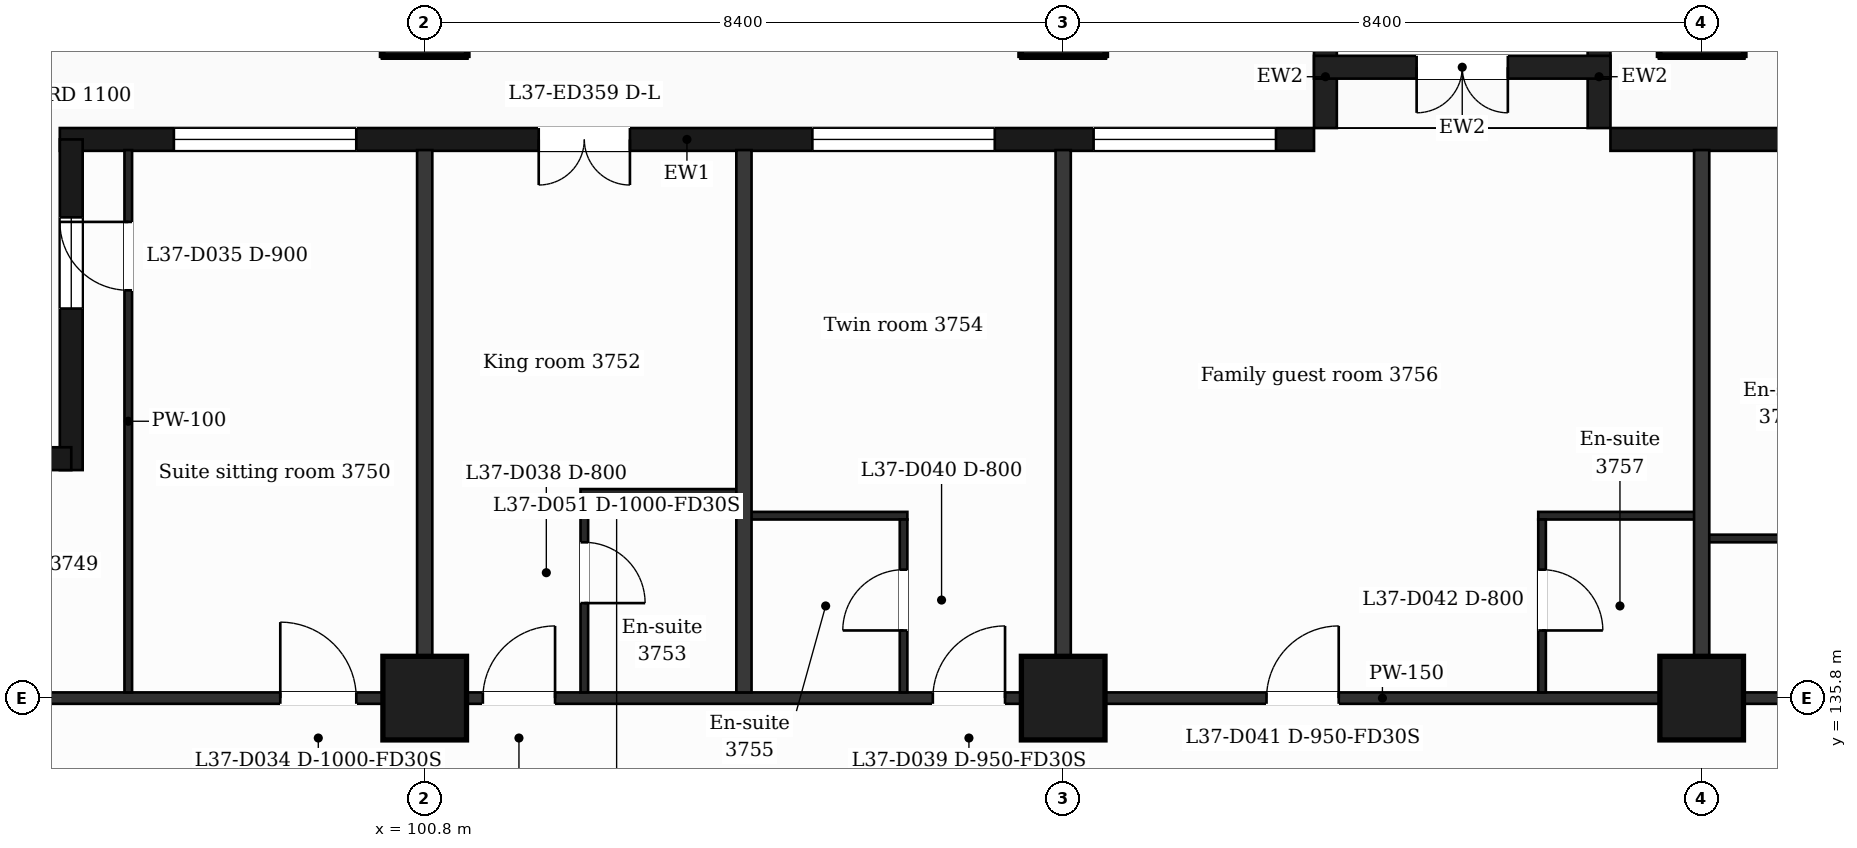
"""IFC4 building model, lengths in metres.
Left out: names, types, materials, properties, quantities, classifications, styles, units other than length and angle.
Written with IfcOpenShell. Run it as: python <this file> out.ifc"""

import sys

from ifc_helpers import new_model, si_unit, direction, frame, frame_2d, origin, origin_2d, place, context, subcontext, project, spatial, rectangle, extrude, element, fill, save


model = new_model("IFC4")
c1 = context("Model", 3, precision=1e-05, world=origin(), true_north=direction((0.0, 1.0)))
c2 = subcontext(c1, "Body", "Model", "MODEL_VIEW")
j1 = project(units=[si_unit("LENGTHUNIT", "METRE"), si_unit("PLANEANGLEUNIT", "RADIAN")], contexts=[c1])
p1 = place(None, origin())
s1 = spatial("IfcSite", under=j1, at=p1, CompositionType="ELEMENT")
p2 = place(p1, origin())
s2 = spatial("IfcBuilding", under=s1, at=p2, CompositionType="ELEMENT")
p3 = place(p2, frame((0.0, 0.0, 158.9)))
s3 = spatial("IfcBuildingStorey", under=s2, at=p3, CompositionType="ELEMENT", Elevation=158.9)
for number, where, z_axis, x_axis in (
    (1, (100.8, 135.8, 0.0), (0.0, 0.0, 1.0), (1.0, 0.0, 0.0)),
    (2, (109.2, 135.8, 0.0), (0.0, 0.0, 1.0), (1.0, 0.0, 0.0)),
    (3, (117.6, 135.8, 0.0), (0.0, 0.0, 1.0), (1.0, 0.0, 0.0)),
    (4, (100.8, 144.8, 0.0), (0.0, 0.0, 1.0), (1.0, 0.0, 0.0)),
    (5, (109.2, 144.8, 0.0), (0.0, 0.0, 1.0), (1.0, 0.0, 0.0)),
    (6, (117.6, 144.8, 0.0), (0.0, 0.0, 1.0), (1.0, 0.0, 0.0)),
):
    element("IfcColumn", number, at=place(p3, frame(where, z_axis=z_axis, x_axis=x_axis)), inside=s3, PredefinedType="COLUMN", context=c2, shape_type="SweptSolid", body=[
        extrude(rectangle(XDim=1.1, YDim=1.1, at=origin_2d()), origin(), (0.0, 0.0, 1.0), 3.7),
    ])
p4 = place(p3, frame((130.65, 143.15, 0.0), z_axis=(0.0, 0.0, 1.0), x_axis=(-1.0, 0.0, 0.0)))
e7 = element("IfcWall", 7, at=p4, inside=s3, PredefinedType="SOLIDWALL", context=c2, shape_type="SweptSolid", body=[
    extrude(rectangle(XDim=14.25, YDim=0.3, at=frame_2d((7.125, 0.0))), origin(), (0.0, 0.0, 1.0), 3.38),
])
p5 = place(p4, frame((1.35, 0.0, 0.9)))
e8 = element("IfcOpeningElement", 8, at=p5, cuts=e7, PredefinedType="OPENING", context=c2, shape_type="SweptSolid", body=[
    extrude(rectangle(XDim=2.4, YDim=2.1, at=frame_2d((1.2, 1.05))), frame((0.0, 0.16, 0.0), z_axis=(0.0, -1.0, 0.0), x_axis=(1.0, 0.0, 0.0)), (0.0, 0.0, 1.0), 0.32),
])
p6 = place(p4, frame((5.25, 0.0, 0.0)))
e9 = element("IfcOpeningElement", 9, at=p6, cuts=e7, PredefinedType="OPENING", context=c2, shape_type="SweptSolid", body=[
    extrude(rectangle(XDim=1.2, YDim=2.4, at=frame_2d((0.6, 1.2))), frame((0.0, 0.16, 0.0), z_axis=(0.0, -1.0, 0.0), x_axis=(1.0, 0.0, 0.0)), (0.0, 0.0, 1.0), 0.32),
])
p7 = place(p4, frame((7.05, 0.0, 0.9)))
e10 = element("IfcOpeningElement", 10, at=p7, cuts=e7, PredefinedType="OPENING", context=c2, shape_type="SweptSolid", body=[
    extrude(rectangle(XDim=1.2, YDim=2.1, at=frame_2d((0.6, 1.05))), frame((0.0, 0.16, 0.0), z_axis=(0.0, -1.0, 0.0), x_axis=(1.0, 0.0, 0.0)), (0.0, 0.0, 1.0), 0.32),
])
p8 = place(p4, frame((10.35, 0.0, 0.9)))
e11 = element("IfcOpeningElement", 11, at=p8, cuts=e7, PredefinedType="OPENING", context=c2, shape_type="SweptSolid", body=[
    extrude(rectangle(XDim=1.2, YDim=2.1, at=frame_2d((0.6, 1.05))), frame((0.0, 0.16, 0.0), z_axis=(0.0, -1.0, 0.0), x_axis=(1.0, 0.0, 0.0)), (0.0, 0.0, 1.0), 0.32),
])
p9 = place(p3, frame((112.5, 143.15, 0.0), z_axis=(0.0, 0.0, 1.0), x_axis=(-1.0, 0.0, 0.0)))
e12 = element("IfcWall", 12, at=p9, inside=s3, PredefinedType="SOLIDWALL", context=c2, shape_type="SweptSolid", body=[
    extrude(rectangle(XDim=16.5, YDim=0.3, at=frame_2d((8.25, 0.0))), origin(), (0.0, 0.0, 1.0), 3.38),
])
p10 = place(p9, frame((0.5, 0.0, 0.9)))
e13 = element("IfcOpeningElement", 13, at=p10, cuts=e12, PredefinedType="OPENING", context=c2, shape_type="SweptSolid", body=[
    extrude(rectangle(XDim=2.4, YDim=2.1, at=frame_2d((1.2, 1.05))), frame((0.0, 0.16, 0.0), z_axis=(0.0, -1.0, 0.0), x_axis=(1.0, 0.0, 0.0)), (0.0, 0.0, 1.0), 0.32),
])
p11 = place(p9, frame((4.2, 0.0, 0.9)))
e14 = element("IfcOpeningElement", 14, at=p11, cuts=e12, PredefinedType="OPENING", context=c2, shape_type="SweptSolid", body=[
    extrude(rectangle(XDim=2.4, YDim=2.1, at=frame_2d((1.2, 1.05))), frame((0.0, 0.16, 0.0), z_axis=(0.0, -1.0, 0.0), x_axis=(1.0, 0.0, 0.0)), (0.0, 0.0, 1.0), 0.32),
])
p12 = place(p9, frame((9.0, 0.0, 0.0)))
e15 = element("IfcOpeningElement", 15, at=p12, cuts=e12, PredefinedType="OPENING", context=c2, shape_type="SweptSolid", body=[
    extrude(rectangle(XDim=1.2, YDim=2.4, at=frame_2d((0.6, 1.2))), frame((0.0, 0.16, 0.0), z_axis=(0.0, -1.0, 0.0), x_axis=(1.0, 0.0, 0.0)), (0.0, 0.0, 1.0), 0.32),
])
p13 = place(p9, frame((12.6, 0.0, 0.9)))
e16 = element("IfcOpeningElement", 16, at=p13, cuts=e12, PredefinedType="OPENING", context=c2, shape_type="SweptSolid", body=[
    extrude(rectangle(XDim=2.4, YDim=2.1, at=frame_2d((1.2, 1.05))), frame((0.0, 0.16, 0.0), z_axis=(0.0, -1.0, 0.0), x_axis=(1.0, 0.0, 0.0)), (0.0, 0.0, 1.0), 0.32),
])
for number, where, z_axis, x_axis in (
    (17, (116.25, 143.3, 0.0), (0.0, 0.0, 1.0), (0.0, 1.0, 0.0)),
    (18, (112.65, 143.3, 0.0), (0.0, 0.0, 1.0), (0.0, 1.0, 0.0)),
):
    element("IfcWall", number, at=place(p3, frame(where, z_axis=z_axis, x_axis=x_axis)), inside=s3, PredefinedType="SOLIDWALL", context=c2, shape_type="SweptSolid", body=[
        extrude(rectangle(XDim=1.35, YDim=0.3, at=frame_2d((0.675, 0.0))), origin(), (0.0, 0.0, 1.0), 3.38),
    ])
p14 = place(p3, frame((116.4, 144.1, 0.0), z_axis=(0.0, 0.0, 1.0), x_axis=(-1.0, 0.0, 0.0)))
e19 = element("IfcWall", 19, at=p14, inside=s3, PredefinedType="SOLIDWALL", context=c2, shape_type="SweptSolid", body=[
    extrude(rectangle(XDim=3.9, YDim=0.3, at=frame_2d((1.95, 0.0))), origin(), (0.0, 0.0, 1.0), 3.38),
])
p15 = place(p14, frame((1.35, 0.0, 0.0)))
e20 = element("IfcOpeningElement", 20, at=p15, cuts=e19, PredefinedType="OPENING", context=c2, shape_type="SweptSolid", body=[
    extrude(rectangle(XDim=1.2, YDim=2.4, at=frame_2d((0.6, 1.2))), frame((0.0, 0.16, 0.0), z_axis=(0.0, -1.0, 0.0), x_axis=(1.0, 0.0, 0.0)), (0.0, 0.0, 1.0), 0.32),
])
p16 = place(p3, frame((96.15, 143.15, 0.0), z_axis=(0.0, 0.0, 1.0), x_axis=(0.0, -1.0, 0.0)))
e21 = element("IfcWall", 21, at=p16, inside=s3, PredefinedType="SOLIDWALL", context=c2, shape_type="SweptSolid", body=[
    extrude(rectangle(XDim=4.35, YDim=0.3, at=frame_2d((2.175, 0.0))), origin(), (0.0, 0.0, 1.0), 3.38),
])
p17 = place(p16, frame((1.025, 0.0, 0.9)))
e22 = element("IfcOpeningElement", 22, at=p17, cuts=e21, PredefinedType="OPENING", context=c2, shape_type="SweptSolid", body=[
    extrude(rectangle(XDim=1.2, YDim=2.1, at=frame_2d((0.6, 1.05))), frame((0.0, 0.16, 0.0), z_axis=(0.0, -1.0, 0.0), x_axis=(1.0, 0.0, 0.0)), (0.0, 0.0, 1.0), 0.32),
])
p18 = place(p3, frame((96.15, 138.95, 0.0), z_axis=(0.0, 0.0, 1.0), x_axis=(-1.0, 0.0, 0.0)))
e23 = element("IfcWall", 23, at=p18, inside=s3, PredefinedType="SOLIDWALL", context=c2, shape_type="SweptSolid", body=[
    extrude(rectangle(XDim=5.104, YDim=0.3, at=frame_2d((2.552, 0.0))), origin(), (0.0, 0.0, 1.0), 3.38),
])
p19 = place(p18, frame((0.725, 0.0, 0.9)))
e24 = element("IfcOpeningElement", 24, at=p19, cuts=e23, PredefinedType="OPENING", context=c2, shape_type="SweptSolid", body=[
    extrude(rectangle(XDim=2.4, YDim=2.1, at=frame_2d((1.2, 1.05))), frame((0.0, 0.16, 0.0), z_axis=(0.0, -1.0, 0.0), x_axis=(1.0, 0.0, 0.0)), (0.0, 0.0, 1.0), 0.32),
])
p20 = place(p3, frame((90.895, 135.8, 0.0), z_axis=(0.0, 0.0, 1.0), x_axis=(1.0, 0.0, 0.0)))
e25 = element("IfcWall", 25, at=p20, inside=s3, PredefinedType="PARTITIONING", context=c2, shape_type="SweptSolid", body=[
    extrude(rectangle(XDim=45.011, YDim=0.15, at=frame_2d((22.505, 0.0))), origin(), (0.0, 0.0, 1.0), 3.38),
])
p21 = place(p20, frame((8.005, 0.0, 0.0)))
e26 = element("IfcOpeningElement", 26, at=p21, cuts=e25, PredefinedType="OPENING", context=c2, shape_type="SweptSolid", body=[
    extrude(rectangle(XDim=1.0, YDim=2.1, at=frame_2d((0.5, 1.05))), frame((0.0, 0.085, 0.0), z_axis=(0.0, -1.0, 0.0), x_axis=(1.0, 0.0, 0.0)), (0.0, 0.0, 1.0), 0.17),
])
p22 = place(p20, frame((10.67, 0.0, 0.0)))
e27 = element("IfcOpeningElement", 27, at=p22, cuts=e25, PredefinedType="OPENING", context=c2, shape_type="SweptSolid", body=[
    extrude(rectangle(XDim=0.95, YDim=2.1, at=frame_2d((0.475, 1.05))), frame((0.0, 0.085, 0.0), z_axis=(0.0, -1.0, 0.0), x_axis=(1.0, 0.0, 0.0)), (0.0, 0.0, 1.0), 0.17),
])
p23 = place(p20, frame((16.59, 0.0, 0.0)))
e28 = element("IfcOpeningElement", 28, at=p23, cuts=e25, PredefinedType="OPENING", context=c2, shape_type="SweptSolid", body=[
    extrude(rectangle(XDim=0.95, YDim=2.1, at=frame_2d((0.475, 1.05))), frame((0.0, 0.085, 0.0), z_axis=(0.0, -1.0, 0.0), x_axis=(1.0, 0.0, 0.0)), (0.0, 0.0, 1.0), 0.17),
])
p24 = place(p20, frame((20.98, 0.0, 0.0)))
e29 = element("IfcOpeningElement", 29, at=p24, cuts=e25, PredefinedType="OPENING", context=c2, shape_type="SweptSolid", body=[
    extrude(rectangle(XDim=0.95, YDim=2.1, at=frame_2d((0.475, 1.05))), frame((0.0, 0.085, 0.0), z_axis=(0.0, -1.0, 0.0), x_axis=(1.0, 0.0, 0.0)), (0.0, 0.0, 1.0), 0.17),
])
p25 = place(p20, frame((29.335, 0.0, 0.0)))
e30 = element("IfcOpeningElement", 30, at=p25, cuts=e25, PredefinedType="OPENING", context=c2, shape_type="SweptSolid", body=[
    extrude(rectangle(XDim=0.95, YDim=2.1, at=frame_2d((0.475, 1.05))), frame((0.0, 0.085, 0.0), z_axis=(0.0, -1.0, 0.0), x_axis=(1.0, 0.0, 0.0)), (0.0, 0.0, 1.0), 0.17),
])
p26 = place(p20, frame((31.156, 0.0, 0.0)))
e31 = element("IfcOpeningElement", 31, at=p26, cuts=e25, PredefinedType="OPENING", context=c2, shape_type="SweptSolid", body=[
    extrude(rectangle(XDim=1.0, YDim=2.1, at=frame_2d((0.5, 1.05))), frame((0.0, 0.085, 0.0), z_axis=(0.0, -1.0, 0.0), x_axis=(1.0, 0.0, 0.0)), (0.0, 0.0, 1.0), 0.17),
])
p27 = place(p20, frame((36.775, 0.0, 0.0)))
e32 = element("IfcOpeningElement", 32, at=p27, cuts=e25, PredefinedType="OPENING", context=c2, shape_type="SweptSolid", body=[
    extrude(rectangle(XDim=1.0, YDim=2.1, at=frame_2d((0.5, 1.05))), frame((0.0, 0.085, 0.0), z_axis=(0.0, -1.0, 0.0), x_axis=(1.0, 0.0, 0.0)), (0.0, 0.0, 1.0), 0.17),
])
for number, where, z_axis, x_axis in (
    (33, (117.6, 137.9, 0.0), (0.0, 0.0, 1.0), (1.0, 0.0, 0.0)),
    (34, (105.0, 138.2, 0.0), (0.0, 0.0, 1.0), (1.0, 0.0, 0.0)),
):
    element("IfcWall", number, at=place(p3, frame(where, z_axis=z_axis, x_axis=x_axis)), inside=s3, PredefinedType="PARTITIONING", context=c2, shape_type="SweptSolid", body=[
        extrude(rectangle(XDim=2.15, YDim=0.1, at=frame_2d((1.075, 0.0))), origin(), (0.0, 0.0, 1.0), 3.38),
    ])
p28 = place(p3, frame((115.45, 138.2, 0.0), z_axis=(0.0, 0.0, 1.0), x_axis=(1.0, 0.0, 0.0)))
e35 = element("IfcWall", 35, at=p28, inside=s3, PredefinedType="PARTITIONING", context=c2, shape_type="SweptSolid", body=[
    extrude(rectangle(XDim=2.15, YDim=0.1, at=frame_2d((1.075, 0.0))), origin(), (0.0, 0.0, 1.0), 3.38),
])
p29 = place(p3, frame((102.85, 138.5, 0.0), z_axis=(0.0, 0.0, 1.0), x_axis=(1.0, 0.0, 0.0)))
e36 = element("IfcWall", 36, at=p29, inside=s3, PredefinedType="PARTITIONING", context=c2, shape_type="SweptSolid", body=[
    extrude(rectangle(XDim=2.15, YDim=0.1, at=frame_2d((1.075, 0.0))), origin(), (0.0, 0.0, 1.0), 3.38),
])
p30 = place(p3, frame((96.9, 135.875, 0.0), z_axis=(0.0, 0.0, 1.0), x_axis=(0.0, 1.0, 0.0)))
e37 = element("IfcWall", 37, at=p30, inside=s3, PredefinedType="PARTITIONING", context=c2, shape_type="SweptSolid", body=[
    extrude(rectangle(XDim=7.135, YDim=0.1, at=frame_2d((3.567, 0.0))), origin(), (0.0, 0.0, 1.0), 3.38),
])
p31 = place(p30, frame((5.29, 0.0, 0.0)))
e38 = element("IfcOpeningElement", 38, at=p31, cuts=e37, PredefinedType="OPENING", context=c2, shape_type="SweptSolid", body=[
    extrude(rectangle(XDim=0.9, YDim=2.1, at=frame_2d((0.45, 1.05))), frame((0.0, 0.06, 0.0), z_axis=(0.0, -1.0, 0.0), x_axis=(1.0, 0.0, 0.0)), (0.0, 0.0, 1.0), 0.12),
])
p32 = place(p3, frame((100.8, 135.875, 0.0), z_axis=(0.0, 0.0, 1.0), x_axis=(0.0, 1.0, 0.0)))
e39 = element("IfcWall", 39, at=p32, inside=s3, PredefinedType="PARTITIONING", context=c2, shape_type="SweptSolid", body=[
    extrude(rectangle(XDim=7.135, YDim=0.2, at=frame_2d((3.567, 0.0))), origin(), (0.0, 0.0, 1.0), 3.38),
])
p33 = place(p3, frame((102.9, 135.875, 0.0), z_axis=(0.0, 0.0, 1.0), x_axis=(0.0, 1.0, 0.0)))
e40 = element("IfcWall", 40, at=p33, inside=s3, PredefinedType="PARTITIONING", context=c2, shape_type="SweptSolid", body=[
    extrude(rectangle(XDim=2.575, YDim=0.1, at=frame_2d((1.288, 0.0))), origin(), (0.0, 0.0, 1.0), 3.38),
])
p34 = place(p33, frame((1.175, 0.0, 0.0)))
e41 = element("IfcOpeningElement", 41, at=p34, cuts=e40, PredefinedType="OPENING", context=c2, shape_type="SweptSolid", body=[
    extrude(rectangle(XDim=0.8, YDim=2.1, at=frame_2d((0.4, 1.05))), frame((0.0, 0.06, 0.0), z_axis=(0.0, -1.0, 0.0), x_axis=(1.0, 0.0, 0.0)), (0.0, 0.0, 1.0), 0.12),
])
p35 = place(p3, frame((105.0, 135.875, 0.0), z_axis=(0.0, 0.0, 1.0), x_axis=(0.0, 1.0, 0.0)))
e42 = element("IfcWall", 42, at=p35, inside=s3, PredefinedType="PARTITIONING", context=c2, shape_type="SweptSolid", body=[
    extrude(rectangle(XDim=7.135, YDim=0.2, at=frame_2d((3.567, 0.0))), origin(), (0.0, 0.0, 1.0), 3.38),
])
p36 = place(p3, frame((107.1, 135.875, 0.0), z_axis=(0.0, 0.0, 1.0), x_axis=(0.0, 1.0, 0.0)))
e43 = element("IfcWall", 43, at=p36, inside=s3, PredefinedType="PARTITIONING", context=c2, shape_type="SweptSolid", body=[
    extrude(rectangle(XDim=2.275, YDim=0.1, at=frame_2d((1.137, 0.0))), origin(), (0.0, 0.0, 1.0), 3.38),
])
p37 = place(p36, frame((0.815, 0.0, 0.0)))
e44 = element("IfcOpeningElement", 44, at=p37, cuts=e43, PredefinedType="OPENING", context=c2, shape_type="SweptSolid", body=[
    extrude(rectangle(XDim=0.8, YDim=2.1, at=frame_2d((0.4, 1.05))), frame((0.0, 0.06, 0.0), z_axis=(0.0, -1.0, 0.0), x_axis=(1.0, 0.0, 0.0)), (0.0, 0.0, 1.0), 0.12),
])
p38 = place(p3, frame((109.2, 135.875, 0.0), z_axis=(0.0, 0.0, 1.0), x_axis=(0.0, 1.0, 0.0)))
e45 = element("IfcWall", 45, at=p38, inside=s3, PredefinedType="PARTITIONING", context=c2, shape_type="SweptSolid", body=[
    extrude(rectangle(XDim=7.135, YDim=0.2, at=frame_2d((3.567, 0.0))), origin(), (0.0, 0.0, 1.0), 3.38),
])
p39 = place(p3, frame((115.5, 135.875, 0.0), z_axis=(0.0, 0.0, 1.0), x_axis=(0.0, 1.0, 0.0)))
e46 = element("IfcWall", 46, at=p39, inside=s3, PredefinedType="PARTITIONING", context=c2, shape_type="SweptSolid", body=[
    extrude(rectangle(XDim=2.275, YDim=0.1, at=frame_2d((1.137, 0.0))), origin(), (0.0, 0.0, 1.0), 3.38),
])
p40 = place(p39, frame((0.815, 0.0, 0.0)))
e47 = element("IfcOpeningElement", 47, at=p40, cuts=e46, PredefinedType="OPENING", context=c2, shape_type="SweptSolid", body=[
    extrude(rectangle(XDim=0.8, YDim=2.1, at=frame_2d((0.4, 1.05))), frame((0.0, 0.06, 0.0), z_axis=(0.0, -1.0, 0.0), x_axis=(1.0, 0.0, 0.0)), (0.0, 0.0, 1.0), 0.12),
])
p41 = place(p3, frame((117.6, 135.875, 0.0), z_axis=(0.0, 0.0, 1.0), x_axis=(0.0, 1.0, 0.0)))
e48 = element("IfcWall", 48, at=p41, inside=s3, PredefinedType="PARTITIONING", context=c2, shape_type="SweptSolid", body=[
    extrude(rectangle(XDim=7.135, YDim=0.2, at=frame_2d((3.567, 0.0))), origin(), (0.0, 0.0, 1.0), 3.38),
])
p42 = place(p10, origin())
e49 = element("IfcWindow", 49, at=p42, inside=s3, PartitioningType="SINGLE_PANEL", PredefinedType="WINDOW", context=c2, shape_type="SweptSolid", body=[
    extrude(rectangle(XDim=2.4, YDim=2.1, at=frame_2d((1.2, 1.05))), frame((0.0, 0.03, 0.0), z_axis=(0.0, -1.0, 0.0), x_axis=(1.0, 0.0, 0.0)), (0.0, 0.0, 1.0), 0.06),
])
fill(e13, e49)
p43 = place(p11, origin())
e50 = element("IfcWindow", 50, at=p43, inside=s3, PartitioningType="SINGLE_PANEL", PredefinedType="WINDOW", context=c2, shape_type="SweptSolid", body=[
    extrude(rectangle(XDim=2.4, YDim=2.1, at=frame_2d((1.2, 1.05))), frame((0.0, 0.03, 0.0), z_axis=(0.0, -1.0, 0.0), x_axis=(1.0, 0.0, 0.0)), (0.0, 0.0, 1.0), 0.06),
])
fill(e14, e50)
p44 = place(p12, origin())
e51 = element("IfcDoor", 51, at=p44, inside=s3, OperationType="DOUBLE_DOOR_SINGLE_SWING", PredefinedType="DOOR", context=c2, shape_type="SweptSolid", body=[
    extrude(rectangle(XDim=1.2, YDim=2.4, at=frame_2d((0.6, 1.2))), frame((0.0, 0.025, 0.0), z_axis=(0.0, -1.0, 0.0), x_axis=(1.0, 0.0, 0.0)), (0.0, 0.0, 1.0), 0.05),
])
fill(e15, e51)
p45 = place(p13, origin())
e52 = element("IfcWindow", 52, at=p45, inside=s3, PartitioningType="SINGLE_PANEL", PredefinedType="WINDOW", context=c2, shape_type="SweptSolid", body=[
    extrude(rectangle(XDim=2.4, YDim=2.1, at=frame_2d((1.2, 1.05))), frame((0.0, 0.03, 0.0), z_axis=(0.0, -1.0, 0.0), x_axis=(1.0, 0.0, 0.0)), (0.0, 0.0, 1.0), 0.06),
])
fill(e16, e52)
p46 = place(p15, origin())
e53 = element("IfcDoor", 53, at=p46, inside=s3, OperationType="DOUBLE_DOOR_SINGLE_SWING", PredefinedType="DOOR", context=c2, shape_type="SweptSolid", body=[
    extrude(rectangle(XDim=1.2, YDim=2.4, at=frame_2d((0.6, 1.2))), frame((0.0, 0.025, 0.0), z_axis=(0.0, -1.0, 0.0), x_axis=(1.0, 0.0, 0.0)), (0.0, 0.0, 1.0), 0.05),
])
fill(e20, e53)
p47 = place(p17, origin())
e54 = element("IfcWindow", 54, at=p47, inside=s3, PartitioningType="SINGLE_PANEL", PredefinedType="WINDOW", context=c2, shape_type="SweptSolid", body=[
    extrude(rectangle(XDim=1.2, YDim=2.1, at=frame_2d((0.6, 1.05))), frame((0.0, 0.03, 0.0), z_axis=(0.0, -1.0, 0.0), x_axis=(1.0, 0.0, 0.0)), (0.0, 0.0, 1.0), 0.06),
])
fill(e22, e54)
p48 = place(p21, origin())
e55 = element("IfcDoor", 55, at=p48, inside=s3, OperationType="SINGLE_SWING_LEFT", PredefinedType="DOOR", context=c2, shape_type="SweptSolid", body=[
    extrude(rectangle(XDim=1.0, YDim=2.1, at=frame_2d((0.5, 1.05))), frame((0.0, 0.025, 0.0), z_axis=(0.0, -1.0, 0.0), x_axis=(1.0, 0.0, 0.0)), (0.0, 0.0, 1.0), 0.05),
])
fill(e26, e55)
p49 = place(p31, origin())
e56 = element("IfcDoor", 56, at=p49, inside=s3, OperationType="SINGLE_SWING_RIGHT", PredefinedType="DOOR", context=c2, shape_type="SweptSolid", body=[
    extrude(rectangle(XDim=0.9, YDim=2.1, at=frame_2d((0.45, 1.05))), frame((0.0, 0.025, 0.0), z_axis=(0.0, -1.0, 0.0), x_axis=(1.0, 0.0, 0.0)), (0.0, 0.0, 1.0), 0.05),
])
fill(e38, e56)
p50 = place(p22, origin())
e57 = element("IfcDoor", 57, at=p50, inside=s3, OperationType="SINGLE_SWING_RIGHT", PredefinedType="DOOR", context=c2, shape_type="SweptSolid", body=[
    extrude(rectangle(XDim=0.95, YDim=2.1, at=frame_2d((0.475, 1.05))), frame((0.0, 0.025, 0.0), z_axis=(0.0, -1.0, 0.0), x_axis=(1.0, 0.0, 0.0)), (0.0, 0.0, 1.0), 0.05),
])
fill(e27, e57)
p51 = place(p34, origin())
e58 = element("IfcDoor", 58, at=p51, inside=s3, OperationType="SINGLE_SWING_LEFT", PredefinedType="DOOR", context=c2, shape_type="SweptSolid", body=[
    extrude(rectangle(XDim=0.8, YDim=2.1, at=frame_2d((0.4, 1.05))), frame((0.0, 0.025, 0.0), z_axis=(0.0, -1.0, 0.0), x_axis=(1.0, 0.0, 0.0)), (0.0, 0.0, 1.0), 0.05),
])
fill(e41, e58)
p52 = place(p23, origin())
e59 = element("IfcDoor", 59, at=p52, inside=s3, OperationType="SINGLE_SWING_RIGHT", PredefinedType="DOOR", context=c2, shape_type="SweptSolid", body=[
    extrude(rectangle(XDim=0.95, YDim=2.1, at=frame_2d((0.475, 1.05))), frame((0.0, 0.025, 0.0), z_axis=(0.0, -1.0, 0.0), x_axis=(1.0, 0.0, 0.0)), (0.0, 0.0, 1.0), 0.05),
])
fill(e28, e59)
p53 = place(p37, origin())
e60 = element("IfcDoor", 60, at=p53, inside=s3, OperationType="SINGLE_SWING_LEFT", PredefinedType="DOOR", context=c2, shape_type="SweptSolid", body=[
    extrude(rectangle(XDim=0.8, YDim=2.1, at=frame_2d((0.4, 1.05))), frame((0.0, 0.025, 0.0), z_axis=(0.0, -1.0, 0.0), x_axis=(1.0, 0.0, 0.0)), (0.0, 0.0, 1.0), 0.05),
])
fill(e44, e60)
p54 = place(p24, origin())
e61 = element("IfcDoor", 61, at=p54, inside=s3, OperationType="SINGLE_SWING_RIGHT", PredefinedType="DOOR", context=c2, shape_type="SweptSolid", body=[
    extrude(rectangle(XDim=0.95, YDim=2.1, at=frame_2d((0.475, 1.05))), frame((0.0, 0.025, 0.0), z_axis=(0.0, -1.0, 0.0), x_axis=(1.0, 0.0, 0.0)), (0.0, 0.0, 1.0), 0.05),
])
fill(e29, e61)
p55 = place(p40, origin())
e62 = element("IfcDoor", 62, at=p55, inside=s3, OperationType="SINGLE_SWING_LEFT", PredefinedType="DOOR", context=c2, shape_type="SweptSolid", body=[
    extrude(rectangle(XDim=0.8, YDim=2.1, at=frame_2d((0.4, 1.05))), frame((0.0, 0.025, 0.0), z_axis=(0.0, -1.0, 0.0), x_axis=(1.0, 0.0, 0.0)), (0.0, 0.0, 1.0), 0.05),
])
fill(e47, e62)
save(model, sys.argv[1])
